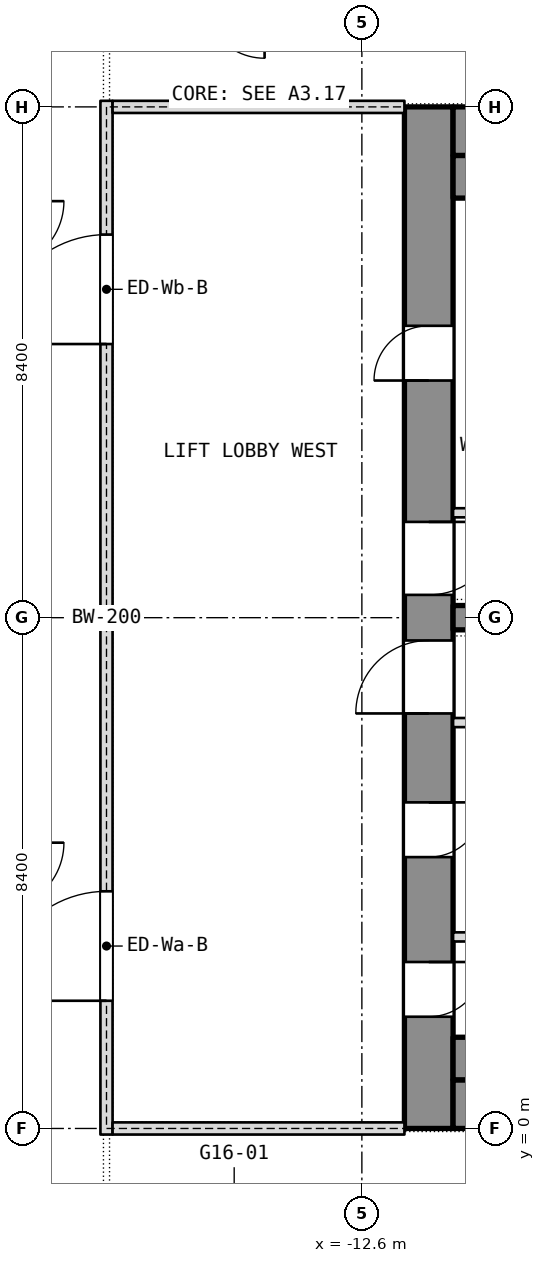
"""IFC4 building model, lengths in metres.
Left out: names, types, materials, properties, quantities, classifications, styles, units other than length and angle.
Written with IfcOpenShell. Run it as: python <this file> out.ifc"""

import sys

from ifc_helpers import new_model, si_unit, direction, frame, frame_2d, origin, place, context, subcontext, project, spatial, rectangle, extrude, element, fill, save


model = new_model("IFC4")
c1 = context("Model", 3, precision=1e-05, world=origin(), true_north=direction((0.0, 1.0)))
c2 = subcontext(c1, "Body", "Model", "MODEL_VIEW")
j1 = project(units=[si_unit("LENGTHUNIT", "METRE"), si_unit("PLANEANGLEUNIT", "RADIAN")], contexts=[c1])
p1 = place(None, origin())
s1 = spatial("IfcSite", under=j1, at=p1, CompositionType="ELEMENT")
p2 = place(p1, origin())
s2 = spatial("IfcBuilding", under=s1, at=p2, CompositionType="ELEMENT")
p3 = place(p2, frame((0.0, 0.0, 198.5)))
s3 = spatial("IfcBuildingStorey", under=s2, at=p3, CompositionType="ELEMENT", Elevation=198.5)
p4 = place(p3, frame((-11.5, 0.0, 0.0), z_axis=(0.0, 0.0, 1.0), x_axis=(0.0, 1.0, 0.0)))
e1 = element("IfcWall", 1, at=p4, inside=s3, PredefinedType="SHEAR", context=c2, shape_type="SweptSolid", body=[
    extrude(rectangle(XDim=16.8, YDim=0.8, at=frame_2d((8.4, 0.0))), origin(), (0.0, 0.0, 1.0), 3.6),
])
p5 = place(p4, frame((1.837, 0.0, 0.0)))
e2 = element("IfcOpeningElement", 2, at=p5, cuts=e1, PredefinedType="OPENING", context=c2, shape_type="SweptSolid", body=[
    extrude(rectangle(XDim=0.9, YDim=2.1, at=frame_2d((0.45, 1.05))), frame((0.0, 0.4, 0.0), z_axis=(0.0, -1.0, 0.0), x_axis=(1.0, 0.0, 0.0)), (0.0, 0.0, 1.0), 0.8),
])
p6 = place(p4, frame((4.462, 0.0, 0.0)))
e3 = element("IfcOpeningElement", 3, at=p6, cuts=e1, PredefinedType="OPENING", context=c2, shape_type="SweptSolid", body=[
    extrude(rectangle(XDim=0.9, YDim=2.1, at=frame_2d((0.45, 1.05))), frame((0.0, 0.4, 0.0), z_axis=(0.0, -1.0, 0.0), x_axis=(1.0, 0.0, 0.0)), (0.0, 0.0, 1.0), 0.8),
])
p7 = place(p4, frame((6.825, 0.0, 0.0)))
e4 = element("IfcOpeningElement", 4, at=p7, cuts=e1, PredefinedType="OPENING", context=c2, shape_type="SweptSolid", body=[
    extrude(rectangle(XDim=1.2, YDim=2.1, at=frame_2d((0.6, 1.05))), frame((0.0, 0.4, 0.0), z_axis=(0.0, -1.0, 0.0), x_axis=(1.0, 0.0, 0.0)), (0.0, 0.0, 1.0), 0.8),
])
p8 = place(p4, frame((12.3, 0.0, 0.0)))
e5 = element("IfcOpeningElement", 5, at=p8, cuts=e1, PredefinedType="OPENING", context=c2, shape_type="SweptSolid", body=[
    extrude(rectangle(XDim=0.9, YDim=2.1, at=frame_2d((0.45, 1.05))), frame((0.0, 0.4, 0.0), z_axis=(0.0, -1.0, 0.0), x_axis=(1.0, 0.0, 0.0)), (0.0, 0.0, 1.0), 0.8),
])
p9 = place(p4, frame((8.775, 0.0, 0.0)))
e6 = element("IfcOpeningElement", 6, at=p9, cuts=e1, PredefinedType="OPENING", context=c2, shape_type="SweptSolid", body=[
    extrude(rectangle(XDim=1.2, YDim=2.1, at=frame_2d((0.6, 1.05))), frame((0.0, 0.4, 0.0), z_axis=(0.0, -1.0, 0.0), x_axis=(1.0, 0.0, 0.0)), (0.0, 0.0, 1.0), 0.8),
])
for number, where, z_axis, x_axis in (
    (7, (-11.1, 0.4, 0.0), (0.0, 0.0, 1.0), (1.0, 0.0, 0.0)),
    (8, (-11.1, 16.4, 0.0), (0.0, 0.0, 1.0), (1.0, 0.0, 0.0)),
):
    element("IfcWall", number, at=place(p3, frame(where, z_axis=z_axis, x_axis=x_axis)), inside=s3, PredefinedType="SHEAR", context=c2, shape_type="SweptSolid", body=[
        extrude(rectangle(XDim=22.2, YDim=0.8, at=frame_2d((11.1, 0.0))), origin(), (0.0, 0.0, 1.0), 3.6),
    ])
p10 = place(p3, frame((-11.1, 8.4, 0.0), z_axis=(0.0, 0.0, 1.0), x_axis=(1.0, 0.0, 0.0)))
e9 = element("IfcWall", 9, at=p10, inside=s3, PredefinedType="SHEAR", context=c2, shape_type="SweptSolid", body=[
    extrude(rectangle(XDim=6.7, YDim=0.4, at=frame_2d((3.35, 0.0))), origin(), (0.0, 0.0, 1.0), 3.6),
])
for number, where, z_axis, x_axis in (
    (10, (-11.1, 1.15, 0.0), (0.0, 0.0, 1.0), (1.0, 0.0, 0.0)),
    (11, (-11.1, 15.65, 0.0), (0.0, 0.0, 1.0), (1.0, 0.0, 0.0)),
):
    element("IfcWall", number, at=place(p3, frame(where, z_axis=z_axis, x_axis=x_axis)), inside=s3, PredefinedType="PARTITIONING", context=c2, shape_type="SweptSolid", body=[
        extrude(rectangle(XDim=22.2, YDim=0.7, at=frame_2d((11.1, 0.0))), origin(), (0.0, 0.0, 1.0), 3.34),
    ])
for number, where, z_axis, x_axis in (
    (12, (-11.1, 6.675, 0.0), (0.0, 0.0, 1.0), (1.0, 0.0, 0.0)),
    (13, (-11.1, 3.15, 0.0), (0.0, 0.0, 1.0), (1.0, 0.0, 0.0)),
    (14, (-11.1, 10.125, 0.0), (0.0, 0.0, 1.0), (1.0, 0.0, 0.0)),
):
    element("IfcWall", number, at=place(p3, frame(where, z_axis=z_axis, x_axis=x_axis)), inside=s3, PredefinedType="PARTITIONING", context=c2, shape_type="SweptSolid", body=[
        extrude(rectangle(XDim=2.1, YDim=0.15, at=frame_2d((1.05, 0.0))), origin(), (0.0, 0.0, 1.0), 3.34),
    ])
p11 = place(p3, frame((-16.8, -0.1, 0.0), z_axis=(0.0, 0.0, 1.0), x_axis=(0.0, 1.0, 0.0)))
e15 = element("IfcWall", 15, at=p11, inside=s3, PredefinedType="PARTITIONING", context=c2, shape_type="SweptSolid", body=[
    extrude(rectangle(XDim=17.0, YDim=0.2, at=frame_2d((8.5, 0.0))), origin(), (0.0, 0.0, 1.0), 3.34),
])
p12 = place(p11, frame((2.2, 0.0, 0.0)))
e16 = element("IfcOpeningElement", 16, at=p12, cuts=e15, PredefinedType="OPENING", context=c2, shape_type="SweptSolid", body=[
    extrude(rectangle(XDim=1.8, YDim=2.1, at=frame_2d((0.9, 1.05))), frame((0.0, 0.1, 0.0), z_axis=(0.0, -1.0, 0.0), x_axis=(1.0, 0.0, 0.0)), (0.0, 0.0, 1.0), 0.2),
])
p13 = place(p11, frame((13.0, 0.0, 0.0)))
e17 = element("IfcOpeningElement", 17, at=p13, cuts=e15, PredefinedType="OPENING", context=c2, shape_type="SweptSolid", body=[
    extrude(rectangle(XDim=1.8, YDim=2.1, at=frame_2d((0.9, 1.05))), frame((0.0, 0.1, 0.0), z_axis=(0.0, -1.0, 0.0), x_axis=(1.0, 0.0, 0.0)), (0.0, 0.0, 1.0), 0.2),
])
for number, where, z_axis, x_axis in (
    (18, (-16.7, 0.0, 0.0), (0.0, 0.0, 1.0), (1.0, 0.0, 0.0)),
    (19, (-16.7, 16.8, 0.0), (0.0, 0.0, 1.0), (1.0, 0.0, 0.0)),
):
    element("IfcWall", number, at=place(p3, frame(where, z_axis=z_axis, x_axis=x_axis)), inside=s3, PredefinedType="PARTITIONING", context=c2, shape_type="SweptSolid", body=[
        extrude(rectangle(XDim=4.8, YDim=0.2, at=frame_2d((2.4, 0.0))), origin(), (0.0, 0.0, 1.0), 2.94),
    ])
p14 = place(p5, origin())
e20 = element("IfcDoor", 20, at=p14, inside=s3, OperationType="SINGLE_SWING_LEFT", PredefinedType="DOOR", context=c2, shape_type="SweptSolid", body=[
    extrude(rectangle(XDim=0.9, YDim=2.1, at=frame_2d((0.45, 1.05))), frame((0.0, 0.025, 0.0), z_axis=(0.0, -1.0, 0.0), x_axis=(1.0, 0.0, 0.0)), (0.0, 0.0, 1.0), 0.05),
])
fill(e2, e20)
p15 = place(p6, origin())
e21 = element("IfcDoor", 21, at=p15, inside=s3, OperationType="SINGLE_SWING_LEFT", PredefinedType="DOOR", context=c2, shape_type="SweptSolid", body=[
    extrude(rectangle(XDim=0.9, YDim=2.1, at=frame_2d((0.45, 1.05))), frame((0.0, 0.025, 0.0), z_axis=(0.0, -1.0, 0.0), x_axis=(1.0, 0.0, 0.0)), (0.0, 0.0, 1.0), 0.05),
])
fill(e3, e21)
p16 = place(p7, origin())
e22 = element("IfcDoor", 22, at=p16, inside=s3, OperationType="SINGLE_SWING_LEFT", PredefinedType="DOOR", context=c2, shape_type="SweptSolid", body=[
    extrude(rectangle(XDim=1.2, YDim=2.1, at=frame_2d((0.6, 1.05))), frame((0.0, 0.025, 0.0), z_axis=(0.0, -1.0, 0.0), x_axis=(1.0, 0.0, 0.0)), (0.0, 0.0, 1.0), 0.05),
])
fill(e4, e22)
p17 = place(p8, origin())
e23 = element("IfcDoor", 23, at=p17, inside=s3, OperationType="SINGLE_SWING_LEFT", PredefinedType="DOOR", context=c2, shape_type="SweptSolid", body=[
    extrude(rectangle(XDim=0.9, YDim=2.1, at=frame_2d((0.45, 1.05))), frame((0.0, 0.025, 0.0), z_axis=(0.0, -1.0, 0.0), x_axis=(1.0, 0.0, 0.0)), (0.0, 0.0, 1.0), 0.05),
])
fill(e5, e23)
p18 = place(p9, origin())
e24 = element("IfcDoor", 24, at=p18, inside=s3, OperationType="SINGLE_SWING_LEFT", PredefinedType="DOOR", context=c2, shape_type="SweptSolid", body=[
    extrude(rectangle(XDim=1.2, YDim=2.1, at=frame_2d((0.6, 1.05))), frame((0.0, 0.025, 0.0), z_axis=(0.0, -1.0, 0.0), x_axis=(1.0, 0.0, 0.0)), (0.0, 0.0, 1.0), 0.05),
])
fill(e6, e24)
p19 = place(p12, origin())
e25 = element("IfcDoor", 25, at=p19, inside=s3, OperationType="DOUBLE_DOOR_SINGLE_SWING", PredefinedType="DOOR", context=c2, shape_type="SweptSolid", body=[
    extrude(rectangle(XDim=1.8, YDim=2.1, at=frame_2d((0.9, 1.05))), frame((0.0, 0.025, 0.0), z_axis=(0.0, -1.0, 0.0), x_axis=(1.0, 0.0, 0.0)), (0.0, 0.0, 1.0), 0.05),
])
fill(e16, e25)
p20 = place(p13, origin())
e26 = element("IfcDoor", 26, at=p20, inside=s3, OperationType="DOUBLE_DOOR_SINGLE_SWING", PredefinedType="DOOR", context=c2, shape_type="SweptSolid", body=[
    extrude(rectangle(XDim=1.8, YDim=2.1, at=frame_2d((0.9, 1.05))), frame((0.0, 0.025, 0.0), z_axis=(0.0, -1.0, 0.0), x_axis=(1.0, 0.0, 0.0)), (0.0, 0.0, 1.0), 0.05),
])
fill(e17, e26)
save(model, sys.argv[1])
